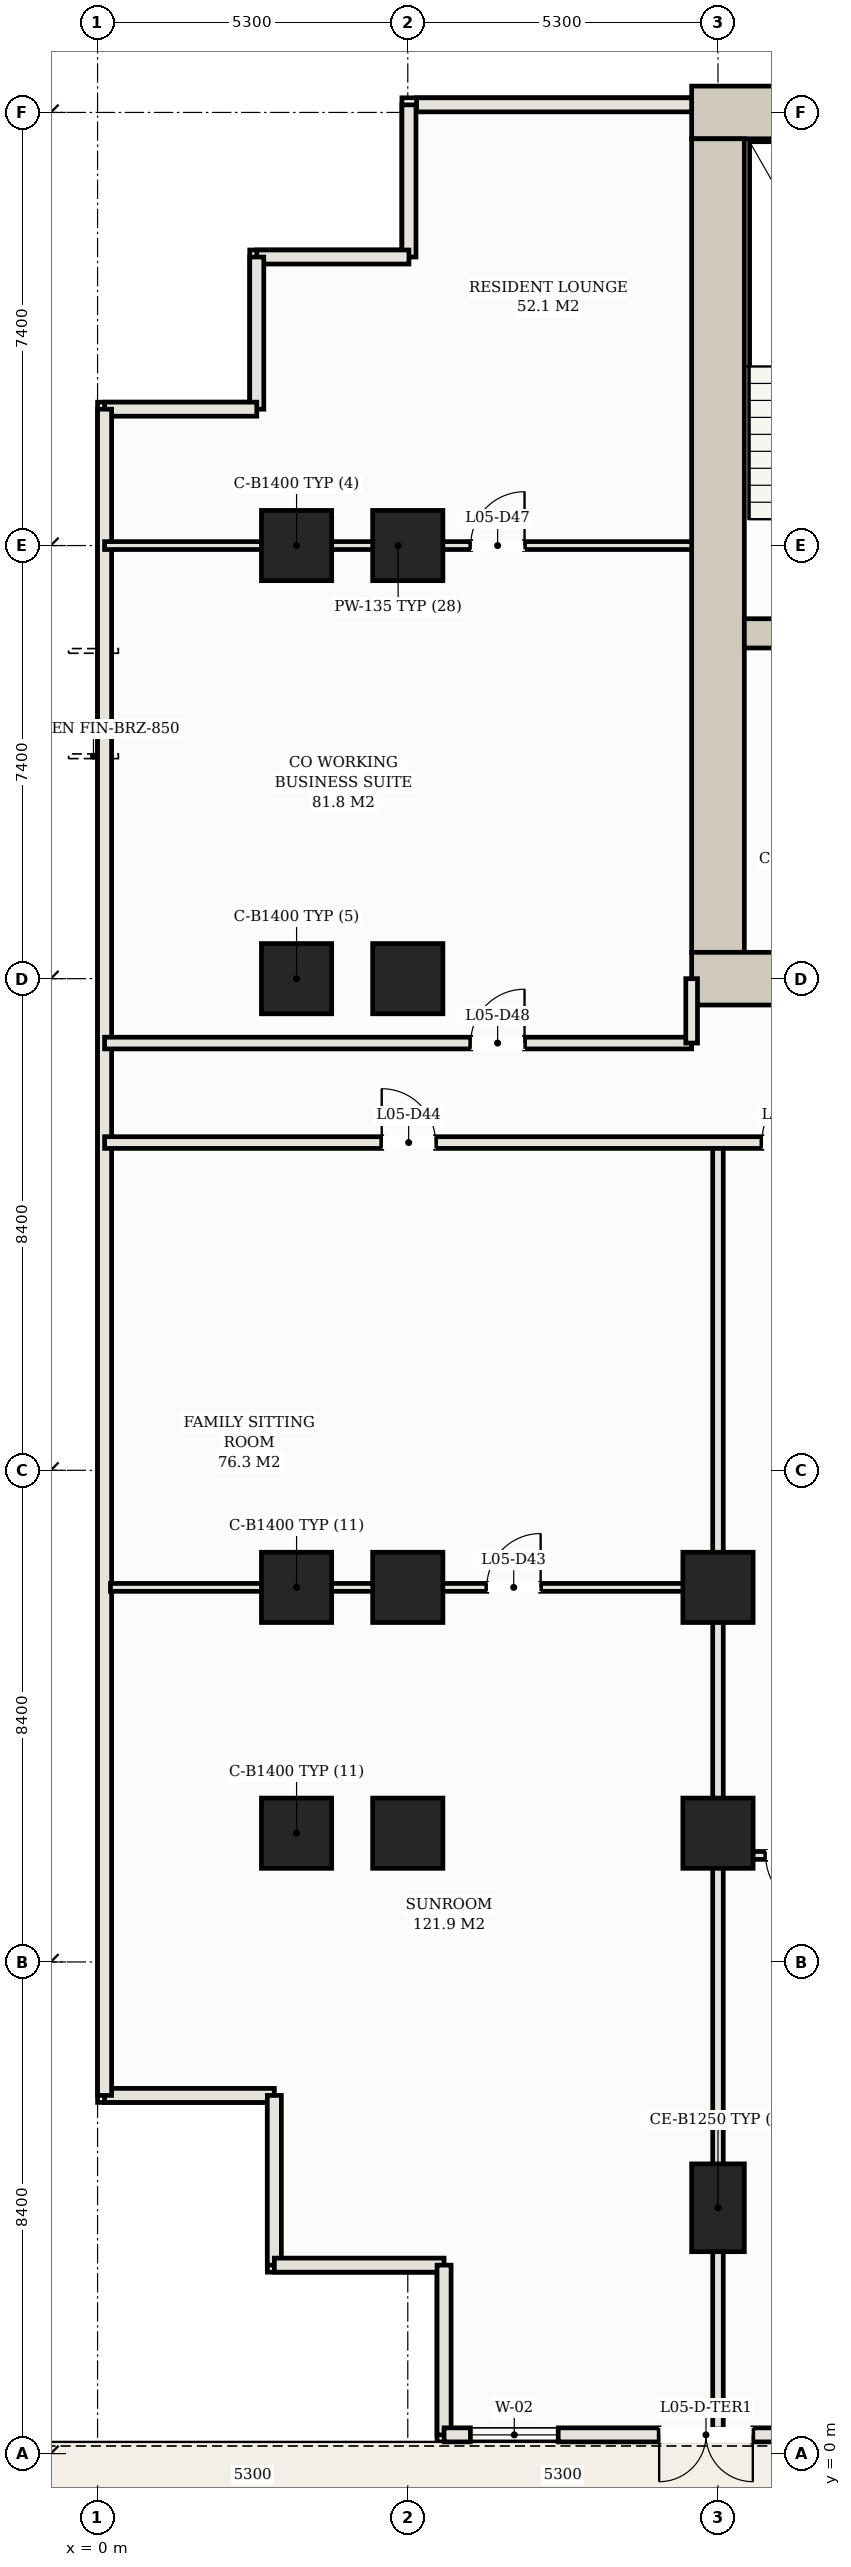
"""IFC4 building model, lengths in metres.
Left out: names, types, materials, properties, quantities, classifications, styles, units other than length and angle.
Written with IfcOpenShell. Run it as: python <this file> out.ifc"""

import sys

from ifc_helpers import new_model, si_unit, direction, frame, frame_2d, origin, origin_2d, place, context, subcontext, project, spatial, rectangle, hollow_rectangle, extrude, element, fill, save


model = new_model("IFC4")
c1 = context("Model", 3, precision=1e-05, world=origin(), true_north=direction((0.0, 1.0)))
c2 = subcontext(c1, "Body", "Model", "MODEL_VIEW")
j1 = project(units=[si_unit("LENGTHUNIT", "METRE"), si_unit("PLANEANGLEUNIT", "RADIAN")], contexts=[c1])
p1 = place(None, origin())
s1 = spatial("IfcSite", under=j1, at=p1, CompositionType="ELEMENT")
p2 = place(p1, origin())
s2 = spatial("IfcBuilding", under=s1, at=p2, CompositionType="ELEMENT")
p3 = place(p2, frame((0.0, 0.0, 24.2)))
s3 = spatial("IfcBuildingStorey", under=s2, at=p3, CompositionType="ELEMENT", Elevation=24.2)
p4 = place(p3, frame((10.15, 40.0, 0.0), z_axis=(0.0, 0.0, 1.0), x_axis=(1.0, 0.0, 0.0)))
e1 = element("IfcWall", 1, at=p4, inside=s3, PredefinedType="SHEAR", context=c2, shape_type="SweptSolid", body=[
    extrude(rectangle(XDim=32.7, YDim=0.9, at=frame_2d((16.35, 0.0))), origin(), (0.0, 0.0, 1.0), 3.08),
])
p5 = place(p3, frame((10.6, 25.65, 0.0), z_axis=(0.0, 0.0, 1.0), x_axis=(0.0, 1.0, 0.0)))
e2 = element("IfcWall", 2, at=p5, inside=s3, PredefinedType="SHEAR", context=c2, shape_type="SweptSolid", body=[
    extrude(rectangle(XDim=13.9, YDim=0.9, at=frame_2d((6.95, 0.0))), origin(), (0.0, 0.0, 1.0), 3.08),
])
p6 = place(p3, frame((10.15, 25.2, 0.0), z_axis=(0.0, 0.0, 1.0), x_axis=(1.0, 0.0, 0.0)))
e3 = element("IfcWall", 3, at=p6, inside=s3, PredefinedType="SHEAR", context=c2, shape_type="SweptSolid", body=[
    extrude(rectangle(XDim=8.25, YDim=0.9, at=frame_2d((4.125, 0.0))), origin(), (0.0, 0.0, 1.0), 3.08),
])
p7 = place(p6, frame((6.35, 0.0, 0.0)))
e4 = element("IfcOpeningElement", 4, at=p7, cuts=e3, PredefinedType="OPENING", context=c2, shape_type="SweptSolid", body=[
    extrude(rectangle(XDim=1.25, YDim=2.2, at=frame_2d((0.625, 1.1))), frame((0.0, 0.46, 0.0), z_axis=(0.0, -1.0, 0.0), x_axis=(1.0, 0.0, 0.0)), (0.0, 0.0, 1.0), 0.92),
])
p8 = place(p3, frame((11.05, 31.1, 0.0), z_axis=(0.0, 0.0, 1.0), x_axis=(1.0, 0.0, 0.0)))
e5 = element("IfcWall", 5, at=p8, inside=s3, PredefinedType="SHEAR", context=c2, shape_type="SweptSolid", body=[
    extrude(rectangle(XDim=3.8, YDim=0.5, at=frame_2d((1.9, 0.0))), origin(), (0.0, 0.0, 1.0), 3.08),
])
for number, where, z_axis, x_axis in (
    (6, (10.6, 14.8, 0.0), (0.0, 0.0, 1.0), (1.0, 0.0, 0.0)),
    (7, (10.6, 10.6, 0.0), (0.0, 0.0, 1.0), (1.0, 0.0, 0.0)),
):
    element("IfcColumn", number, at=place(p3, frame(where, z_axis=z_axis, x_axis=x_axis)), inside=s3, PredefinedType="COLUMN", context=c2, shape_type="SweptSolid", body=[
        extrude(hollow_rectangle(XDim=1.2, YDim=1.2, WallThickness=0.04, at=origin_2d()), origin(), (0.0, 0.0, 1.0), 3.3),
    ])
p9 = place(p3, frame((10.6, 4.2, 0.0), z_axis=(0.0, 0.0, 1.0), x_axis=(1.0, 0.0, 0.0)))
e8 = element("IfcColumn", 8, at=p9, inside=s3, PredefinedType="COLUMN", context=c2, shape_type="SweptSolid", body=[
    extrude(hollow_rectangle(XDim=0.9, YDim=1.5, WallThickness=0.036, at=origin_2d()), origin(), (0.0, 0.0, 1.0), 3.3),
])
for number, where, z_axis, x_axis in (
    (9, (3.4, 10.6, 0.0), (0.0, 0.0, 1.0), (1.0, 0.0, 0.0)),
    (10, (3.4, 14.8, 0.0), (0.0, 0.0, 1.0), (1.0, 0.0, 0.0)),
    (11, (3.4, 25.2, 0.0), (0.0, 0.0, 1.0), (1.0, 0.0, 0.0)),
    (12, (3.4, 32.6, 0.0), (0.0, 0.0, 1.0), (1.0, 0.0, 0.0)),
    (13, (5.3, 10.6, 0.0), (0.0, 0.0, 1.0), (1.0, 0.0, 0.0)),
    (14, (5.3, 14.8, 0.0), (0.0, 0.0, 1.0), (1.0, 0.0, 0.0)),
    (15, (5.3, 25.2, 0.0), (0.0, 0.0, 1.0), (1.0, 0.0, 0.0)),
    (16, (5.3, 32.6, 0.0), (0.0, 0.0, 1.0), (1.0, 0.0, 0.0)),
):
    element("IfcColumn", number, at=place(p3, frame(where, z_axis=z_axis, x_axis=x_axis)), inside=s3, PredefinedType="COLUMN", context=c2, shape_type="SweptSolid", body=[
        extrude(hollow_rectangle(XDim=1.2, YDim=1.2, WallThickness=0.04, at=origin_2d()), origin(), (0.0, 0.0, 1.0), 3.3),
    ])
p10 = place(p3, frame((0.12, 6.12, 0.0), z_axis=(0.0, 0.0, 1.0), x_axis=(1.0, 0.0, 0.0)))
e17 = element("IfcWall", 17, at=p10, inside=s3, PredefinedType="SOLIDWALL", context=c2, shape_type="SweptSolid", body=[
    extrude(rectangle(XDim=2.9, YDim=0.24, at=frame_2d((1.45, 0.0))), origin(), (0.0, 0.0, 1.0), 3.08),
])
p11 = place(p3, frame((3.02, 6.12, 0.0), z_axis=(0.0, 0.0, 1.0), x_axis=(0.0, -1.0, 0.0)))
e18 = element("IfcWall", 18, at=p11, inside=s3, PredefinedType="SOLIDWALL", context=c2, shape_type="SweptSolid", body=[
    extrude(rectangle(XDim=2.9, YDim=0.24, at=frame_2d((1.45, 0.0))), origin(), (0.0, 0.0, 1.0), 3.08),
])
for number, where, z_axis, x_axis in (
    (19, (3.02, 3.22, 0.0), (0.0, 0.0, 1.0), (1.0, 0.0, 0.0)),
    (20, (5.92, 3.22, 0.0), (0.0, 0.0, 1.0), (0.0, -1.0, 0.0)),
):
    element("IfcWall", number, at=place(p3, frame(where, z_axis=z_axis, x_axis=x_axis)), inside=s3, PredefinedType="SOLIDWALL", context=c2, shape_type="SweptSolid", body=[
        extrude(rectangle(XDim=2.9, YDim=0.24, at=frame_2d((1.45, 0.0))), origin(), (0.0, 0.0, 1.0), 3.08),
    ])
p12 = place(p3, frame((5.92, 0.32, 0.0), z_axis=(0.0, 0.0, 1.0), x_axis=(1.0, 0.0, 0.0)))
e21 = element("IfcWall", 21, at=p12, inside=s3, PredefinedType="SOLIDWALL", context=c2, shape_type="SweptSolid", body=[
    extrude(rectangle(XDim=8.95, YDim=0.24, at=frame_2d((4.475, 0.0))), origin(), (0.0, 0.0, 1.0), 3.08),
])
p13 = place(p12, frame((3.675, 0.0, 0.0)))
e22 = element("IfcOpeningElement", 22, at=p13, cuts=e21, PredefinedType="OPENING", context=c2, shape_type="SweptSolid", body=[
    extrude(rectangle(XDim=1.6, YDim=2.25, at=frame_2d((0.8, 1.125))), frame((0.0, 0.13, 0.0), z_axis=(0.0, -1.0, 0.0), x_axis=(1.0, 0.0, 0.0)), (0.0, 0.0, 1.0), 0.26),
])
p14 = place(p12, frame((0.45, 0.0, 0.75)))
e23 = element("IfcOpeningElement", 23, at=p14, cuts=e21, PredefinedType="OPENING", context=c2, shape_type="SweptSolid", body=[
    extrude(rectangle(XDim=1.5, YDim=1.6, at=frame_2d((0.75, 0.8))), frame((0.0, 0.13, 0.0), z_axis=(0.0, -1.0, 0.0), x_axis=(1.0, 0.0, 0.0)), (0.0, 0.0, 1.0), 0.26),
])
p15 = place(p3, frame((10.15, 40.13, 0.0), z_axis=(0.0, 0.0, 1.0), x_axis=(-1.0, 0.0, 0.0)))
e24 = element("IfcWall", 24, at=p15, inside=s3, PredefinedType="SOLIDWALL", context=c2, shape_type="SweptSolid", body=[
    extrude(rectangle(XDim=4.7, YDim=0.24, at=frame_2d((2.35, 0.0))), origin(), (0.0, 0.0, 1.0), 3.08),
])
p16 = place(p3, frame((5.32, 40.13, 0.0), z_axis=(0.0, 0.0, 1.0), x_axis=(0.0, -1.0, 0.0)))
e25 = element("IfcWall", 25, at=p16, inside=s3, PredefinedType="SOLIDWALL", context=c2, shape_type="SweptSolid", body=[
    extrude(rectangle(XDim=2.6, YDim=0.24, at=frame_2d((1.3, 0.0))), origin(), (0.0, 0.0, 1.0), 3.08),
])
for number, where, z_axis, x_axis in (
    (26, (5.32, 37.53, 0.0), (0.0, 0.0, 1.0), (-1.0, 0.0, 0.0)),
    (27, (2.72, 37.53, 0.0), (0.0, 0.0, 1.0), (0.0, -1.0, 0.0)),
):
    element("IfcWall", number, at=place(p3, frame(where, z_axis=z_axis, x_axis=x_axis)), inside=s3, PredefinedType="SOLIDWALL", context=c2, shape_type="SweptSolid", body=[
        extrude(rectangle(XDim=2.6, YDim=0.24, at=frame_2d((1.3, 0.0))), origin(), (0.0, 0.0, 1.0), 3.08),
    ])
p17 = place(p3, frame((2.72, 34.93, 0.0), z_axis=(0.0, 0.0, 1.0), x_axis=(-1.0, 0.0, 0.0)))
e28 = element("IfcWall", 28, at=p17, inside=s3, PredefinedType="SOLIDWALL", context=c2, shape_type="SweptSolid", body=[
    extrude(rectangle(XDim=2.6, YDim=0.24, at=frame_2d((1.3, 0.0))), origin(), (0.0, 0.0, 1.0), 3.08),
])
p18 = place(p3, frame((0.12, 34.93, 0.0), z_axis=(0.0, 0.0, 1.0), x_axis=(0.0, -1.0, 0.0)))
e29 = element("IfcWall", 29, at=p18, inside=s3, PredefinedType="SOLIDWALL", context=c2, shape_type="SweptSolid", body=[
    extrude(rectangle(XDim=28.81, YDim=0.24, at=frame_2d((14.405, 0.0))), origin(), (0.0, 0.0, 1.0), 3.08),
])
p19 = place(p3, frame((0.12, 22.4, 0.0), z_axis=(0.0, 0.0, 1.0), x_axis=(1.0, 0.0, 0.0)))
e30 = element("IfcWall", 30, at=p19, inside=s3, PredefinedType="PARTITIONING", context=c2, shape_type="SweptSolid", body=[
    extrude(rectangle(XDim=52.76, YDim=0.2, at=frame_2d((26.38, 0.0))), origin(), (0.0, 0.0, 1.0), 2.57),
])
p20 = place(p19, frame((11.23, 0.0, 0.0)))
e31 = element("IfcOpeningElement", 31, at=p20, cuts=e30, PredefinedType="OPENING", context=c2, shape_type="SweptSolid", body=[
    extrude(rectangle(XDim=1.1, YDim=2.25, at=frame_2d((0.55, 1.125))), frame((0.0, 0.11, 0.0), z_axis=(0.0, -1.0, 0.0), x_axis=(1.0, 0.0, 0.0)), (0.0, 0.0, 1.0), 0.22),
])
p21 = place(p19, frame((16.53, 0.0, 0.0)))
e32 = element("IfcOpeningElement", 32, at=p21, cuts=e30, PredefinedType="OPENING", context=c2, shape_type="SweptSolid", body=[
    extrude(rectangle(XDim=1.1, YDim=2.25, at=frame_2d((0.55, 1.125))), frame((0.0, 0.11, 0.0), z_axis=(0.0, -1.0, 0.0), x_axis=(1.0, 0.0, 0.0)), (0.0, 0.0, 1.0), 0.22),
])
p22 = place(p19, frame((21.83, 0.0, 0.0)))
e33 = element("IfcOpeningElement", 33, at=p22, cuts=e30, PredefinedType="OPENING", context=c2, shape_type="SweptSolid", body=[
    extrude(rectangle(XDim=1.1, YDim=2.25, at=frame_2d((0.55, 1.125))), frame((0.0, 0.11, 0.0), z_axis=(0.0, -1.0, 0.0), x_axis=(1.0, 0.0, 0.0)), (0.0, 0.0, 1.0), 0.22),
])
p23 = place(p19, frame((27.13, 0.0, 0.0)))
e34 = element("IfcOpeningElement", 34, at=p23, cuts=e30, PredefinedType="OPENING", context=c2, shape_type="SweptSolid", body=[
    extrude(rectangle(XDim=1.1, YDim=2.25, at=frame_2d((0.55, 1.125))), frame((0.0, 0.11, 0.0), z_axis=(0.0, -1.0, 0.0), x_axis=(1.0, 0.0, 0.0)), (0.0, 0.0, 1.0), 0.22),
])
p24 = place(p19, frame((32.43, 0.0, 0.0)))
e35 = element("IfcOpeningElement", 35, at=p24, cuts=e30, PredefinedType="OPENING", context=c2, shape_type="SweptSolid", body=[
    extrude(rectangle(XDim=1.1, YDim=2.25, at=frame_2d((0.55, 1.125))), frame((0.0, 0.11, 0.0), z_axis=(0.0, -1.0, 0.0), x_axis=(1.0, 0.0, 0.0)), (0.0, 0.0, 1.0), 0.22),
])
p25 = place(p19, frame((37.73, 0.0, 0.0)))
e36 = element("IfcOpeningElement", 36, at=p25, cuts=e30, PredefinedType="OPENING", context=c2, shape_type="SweptSolid", body=[
    extrude(rectangle(XDim=1.1, YDim=2.25, at=frame_2d((0.55, 1.125))), frame((0.0, 0.11, 0.0), z_axis=(0.0, -1.0, 0.0), x_axis=(1.0, 0.0, 0.0)), (0.0, 0.0, 1.0), 0.22),
])
p26 = place(p19, frame((4.735, 0.0, 0.0)))
e37 = element("IfcOpeningElement", 37, at=p26, cuts=e30, PredefinedType="OPENING", context=c2, shape_type="SweptSolid", body=[
    extrude(rectangle(XDim=0.92, YDim=2.15, at=frame_2d((0.46, 1.075))), frame((0.0, 0.11, 0.0), z_axis=(0.0, -1.0, 0.0), x_axis=(1.0, 0.0, 0.0)), (0.0, 0.0, 1.0), 0.22),
])
p27 = place(p19, frame((47.105, 0.0, 0.0)))
e38 = element("IfcOpeningElement", 38, at=p27, cuts=e30, PredefinedType="OPENING", context=c2, shape_type="SweptSolid", body=[
    extrude(rectangle(XDim=0.92, YDim=2.15, at=frame_2d((0.46, 1.075))), frame((0.0, 0.11, 0.0), z_axis=(0.0, -1.0, 0.0), x_axis=(1.0, 0.0, 0.0)), (0.0, 0.0, 1.0), 0.22),
])
p28 = place(p3, frame((0.12, 24.1, 0.0), z_axis=(0.0, 0.0, 1.0), x_axis=(1.0, 0.0, 0.0)))
e39 = element("IfcWall", 39, at=p28, inside=s3, PredefinedType="PARTITIONING", context=c2, shape_type="SweptSolid", body=[
    extrude(rectangle(XDim=10.03, YDim=0.2, at=frame_2d((5.015, 0.0))), origin(), (0.0, 0.0, 1.0), 2.57),
])
p29 = place(p28, frame((6.255, 0.0, 0.0)))
e40 = element("IfcOpeningElement", 40, at=p29, cuts=e39, PredefinedType="OPENING", context=c2, shape_type="SweptSolid", body=[
    extrude(rectangle(XDim=0.92, YDim=2.15, at=frame_2d((0.46, 1.075))), frame((0.0, 0.11, 0.0), z_axis=(0.0, -1.0, 0.0), x_axis=(1.0, 0.0, 0.0)), (0.0, 0.0, 1.0), 0.22),
])
p30 = place(p3, frame((10.15, 24.1, 0.0), z_axis=(0.0, 0.0, 1.0), x_axis=(0.0, 1.0, 0.0)))
e41 = element("IfcWall", 41, at=p30, inside=s3, PredefinedType="PARTITIONING", context=c2, shape_type="SweptSolid", body=[
    extrude(rectangle(XDim=1.1, YDim=0.2, at=frame_2d((0.55, 0.0))), origin(), (0.0, 0.0, 1.0), 2.57),
])
p31 = place(p3, frame((10.6, 0.42, 0.0), z_axis=(0.0, 0.0, 1.0), x_axis=(0.0, 1.0, 0.0)))
e42 = element("IfcWall", 42, at=p31, inside=s3, PredefinedType="PARTITIONING", context=c2, shape_type="SweptSolid", body=[
    extrude(rectangle(XDim=21.88, YDim=0.18, at=frame_2d((10.94, 0.0))), origin(), (0.0, 0.0, 1.0), 2.275),
])
p32 = place(p3, frame((10.6, 10.22, 0.0), z_axis=(0.0, 0.0, 1.0), x_axis=(1.0, 0.0, 0.0)))
e43 = element("IfcWall", 43, at=p32, inside=s3, PredefinedType="PARTITIONING", context=c2, shape_type="SweptSolid", body=[
    extrude(rectangle(XDim=5.3, YDim=0.135, at=frame_2d((2.65, 0.0))), origin(), (0.0, 0.0, 1.0), 2.57),
])
p33 = place(p32, frame((0.815, 0.0, 0.0)))
e44 = element("IfcOpeningElement", 44, at=p33, cuts=e43, PredefinedType="OPENING", context=c2, shape_type="SweptSolid", body=[
    extrude(rectangle(XDim=0.92, YDim=2.15, at=frame_2d((0.46, 1.075))), frame((0.0, 0.078, 0.0), z_axis=(0.0, -1.0, 0.0), x_axis=(1.0, 0.0, 0.0)), (0.0, 0.0, 1.0), 0.155),
])
p34 = place(p3, frame((0.22, 14.8, 0.0), z_axis=(0.0, 0.0, 1.0), x_axis=(1.0, 0.0, 0.0)))
e45 = element("IfcWall", 45, at=p34, inside=s3, PredefinedType="PARTITIONING", context=c2, shape_type="SweptSolid", body=[
    extrude(rectangle(XDim=10.38, YDim=0.135, at=frame_2d((5.19, 0.0))), origin(), (0.0, 0.0, 1.0), 2.275),
])
p35 = place(p34, frame((6.43, 0.0, 0.0)))
e46 = element("IfcOpeningElement", 46, at=p35, cuts=e45, PredefinedType="OPENING", context=c2, shape_type="SweptSolid", body=[
    extrude(rectangle(XDim=0.92, YDim=2.15, at=frame_2d((0.46, 1.075))), frame((0.0, 0.078, 0.0), z_axis=(0.0, -1.0, 0.0), x_axis=(1.0, 0.0, 0.0)), (0.0, 0.0, 1.0), 0.155),
])
p36 = place(p3, frame((0.12, 32.6, 0.0), z_axis=(0.0, 0.0, 1.0), x_axis=(1.0, 0.0, 0.0)))
e47 = element("IfcWall", 47, at=p36, inside=s3, PredefinedType="PARTITIONING", context=c2, shape_type="SweptSolid", body=[
    extrude(rectangle(XDim=10.03, YDim=0.135, at=frame_2d((5.015, 0.0))), origin(), (0.0, 0.0, 1.0), 2.275),
])
p37 = place(p36, frame((6.255, 0.0, 0.0)))
e48 = element("IfcOpeningElement", 48, at=p37, cuts=e47, PredefinedType="OPENING", context=c2, shape_type="SweptSolid", body=[
    extrude(rectangle(XDim=0.92, YDim=2.15, at=frame_2d((0.46, 1.075))), frame((0.0, 0.078, 0.0), z_axis=(0.0, -1.0, 0.0), x_axis=(1.0, 0.0, 0.0)), (0.0, 0.0, 1.0), 0.155),
])
p38 = place(p13, frame((1.6, 0.0, 0.0), z_axis=(0.0, 0.0, 1.0), x_axis=(-1.0, 0.0, 0.0)))
e49 = element("IfcDoor", 49, at=p38, inside=s3, OperationType="DOUBLE_DOOR_SINGLE_SWING", PredefinedType="DOOR", context=c2, shape_type="SweptSolid", body=[
    extrude(rectangle(XDim=1.6, YDim=2.25, at=frame_2d((0.8, 1.125))), frame((0.0, 0.025, 0.0), z_axis=(0.0, -1.0, 0.0), x_axis=(1.0, 0.0, 0.0)), (0.0, 0.0, 1.0), 0.05),
])
fill(e22, e49)
p39 = place(p14, origin())
e50 = element("IfcWindow", 50, at=p39, inside=s3, PartitioningType="SINGLE_PANEL", PredefinedType="WINDOW", context=c2, shape_type="SweptSolid", body=[
    extrude(rectangle(XDim=1.5, YDim=1.6, at=frame_2d((0.75, 0.8))), frame((0.0, 0.03, 0.0), z_axis=(0.0, -1.0, 0.0), x_axis=(1.0, 0.0, 0.0)), (0.0, 0.0, 1.0), 0.06),
])
fill(e23, e50)
p40 = place(p20, origin())
e51 = element("IfcDoor", 51, at=p40, inside=s3, OperationType="SINGLE_SWING_RIGHT", PredefinedType="DOOR", context=c2, shape_type="SweptSolid", body=[
    extrude(rectangle(XDim=1.1, YDim=2.25, at=frame_2d((0.55, 1.125))), frame((0.0, 0.025, 0.0), z_axis=(0.0, -1.0, 0.0), x_axis=(1.0, 0.0, 0.0)), (0.0, 0.0, 1.0), 0.05),
])
fill(e31, e51)
p41 = place(p33, frame((0.92, 0.0, 0.0), z_axis=(0.0, 0.0, 1.0), x_axis=(-1.0, 0.0, 0.0)))
e52 = element("IfcDoor", 52, at=p41, inside=s3, OperationType="SINGLE_SWING_LEFT", PredefinedType="DOOR", context=c2, shape_type="SweptSolid", body=[
    extrude(rectangle(XDim=0.92, YDim=2.15, at=frame_2d((0.46, 1.075))), frame((0.0, 0.025, 0.0), z_axis=(0.0, -1.0, 0.0), x_axis=(1.0, 0.0, 0.0)), (0.0, 0.0, 1.0), 0.05),
])
fill(e44, e52)
p42 = place(p35, origin())
e53 = element("IfcDoor", 53, at=p42, inside=s3, OperationType="SINGLE_SWING_RIGHT", PredefinedType="DOOR", context=c2, shape_type="SweptSolid", body=[
    extrude(rectangle(XDim=0.92, YDim=2.15, at=frame_2d((0.46, 1.075))), frame((0.0, 0.025, 0.0), z_axis=(0.0, -1.0, 0.0), x_axis=(1.0, 0.0, 0.0)), (0.0, 0.0, 1.0), 0.05),
])
fill(e46, e53)
p43 = place(p26, origin())
e54 = element("IfcDoor", 54, at=p43, inside=s3, OperationType="SINGLE_SWING_LEFT", PredefinedType="DOOR", context=c2, shape_type="SweptSolid", body=[
    extrude(rectangle(XDim=0.92, YDim=2.15, at=frame_2d((0.46, 1.075))), frame((0.0, 0.025, 0.0), z_axis=(0.0, -1.0, 0.0), x_axis=(1.0, 0.0, 0.0)), (0.0, 0.0, 1.0), 0.05),
])
fill(e37, e54)
p44 = place(p37, origin())
e55 = element("IfcDoor", 55, at=p44, inside=s3, OperationType="SINGLE_SWING_RIGHT", PredefinedType="DOOR", context=c2, shape_type="SweptSolid", body=[
    extrude(rectangle(XDim=0.92, YDim=2.15, at=frame_2d((0.46, 1.075))), frame((0.0, 0.025, 0.0), z_axis=(0.0, -1.0, 0.0), x_axis=(1.0, 0.0, 0.0)), (0.0, 0.0, 1.0), 0.05),
])
fill(e48, e55)
p45 = place(p29, origin())
e56 = element("IfcDoor", 56, at=p45, inside=s3, OperationType="SINGLE_SWING_RIGHT", PredefinedType="DOOR", context=c2, shape_type="SweptSolid", body=[
    extrude(rectangle(XDim=0.92, YDim=2.15, at=frame_2d((0.46, 1.075))), frame((0.0, 0.025, 0.0), z_axis=(0.0, -1.0, 0.0), x_axis=(1.0, 0.0, 0.0)), (0.0, 0.0, 1.0), 0.05),
])
fill(e40, e56)
save(model, sys.argv[1])
